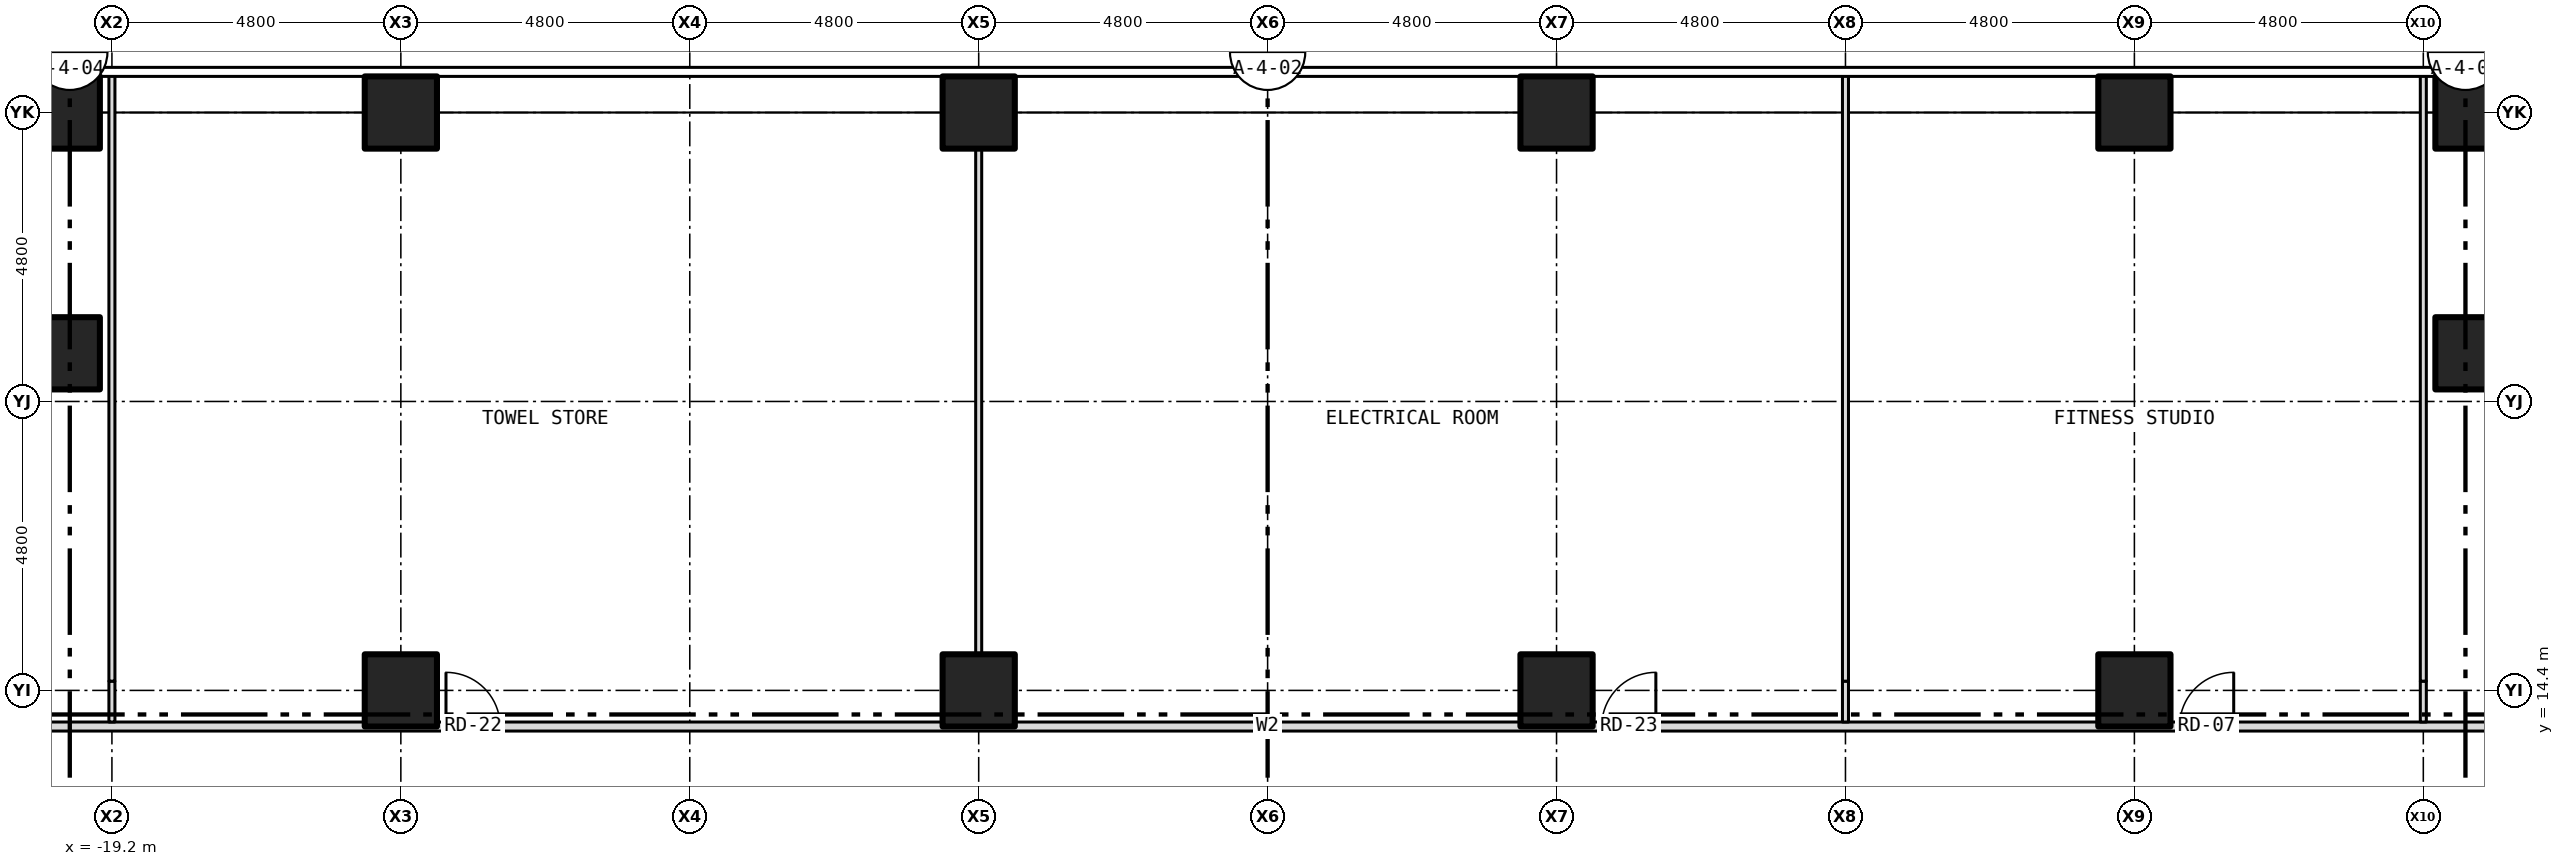
"""IFC4 building model, lengths in metres.
Left out: names, types, materials, properties, quantities, classifications, styles, units other than length and angle.
Written with IfcOpenShell. Run it as: python <this file> out.ifc"""

import sys

from ifc_helpers import new_model, si_unit, direction, frame, frame_2d, origin, origin_2d, place, context, subcontext, project, spatial, rectangle, hollow_rectangle, extrude, element, fill, save


model = new_model("IFC4")
c1 = context("Model", 3, precision=1e-05, world=origin(), true_north=direction((0.0, 1.0)))
c2 = subcontext(c1, "Body", "Model", "MODEL_VIEW")
j1 = project(units=[si_unit("LENGTHUNIT", "METRE"), si_unit("PLANEANGLEUNIT", "RADIAN")], contexts=[c1])
p1 = place(None, origin())
s1 = spatial("IfcSite", under=j1, at=p1, CompositionType="ELEMENT")
p2 = place(p1, origin())
s2 = spatial("IfcBuilding", under=s1, at=p2, CompositionType="ELEMENT")
p3 = place(p2, frame((0.0, 0.0, 24.5)))
s3 = spatial("IfcBuildingStorey", under=s2, at=p3, CompositionType="ELEMENT", Elevation=24.5)
for number, where, z_axis, x_axis in (
    (1, (-20.0, 24.0, -0.2), (0.0, 0.0, 1.0), (1.0, 0.0, 0.0)),
    (2, (-14.4, 24.0, -0.2), (0.0, 0.0, 1.0), (1.0, 0.0, 0.0)),
    (3, (-4.8, 24.0, -0.2), (0.0, 0.0, 1.0), (1.0, 0.0, 0.0)),
    (4, (4.8, 24.0, -0.2), (0.0, 0.0, 1.0), (1.0, 0.0, 0.0)),
    (5, (14.4, 24.0, -0.2), (0.0, 0.0, 1.0), (1.0, 0.0, 0.0)),
    (6, (20.0, 24.0, -0.2), (0.0, 0.0, 1.0), (1.0, 0.0, 0.0)),
    (7, (-20.0, 20.0, -0.2), (0.0, 0.0, 1.0), (1.0, 0.0, 0.0)),
    (8, (-14.4, 14.4, -0.2), (0.0, 0.0, 1.0), (1.0, 0.0, 0.0)),
    (9, (-4.8, 14.4, -0.2), (0.0, 0.0, 1.0), (1.0, 0.0, 0.0)),
    (10, (4.8, 14.4, -0.2), (0.0, 0.0, 1.0), (1.0, 0.0, 0.0)),
    (11, (14.4, 14.4, -0.2), (0.0, 0.0, 1.0), (1.0, 0.0, 0.0)),
    (12, (20.0, 20.0, -0.2), (0.0, 0.0, 1.0), (1.0, 0.0, 0.0)),
):
    element("IfcColumn", number, at=place(p3, frame(where, z_axis=z_axis, x_axis=x_axis)), inside=s3, PredefinedType="COLUMN", context=c2, shape_type="SweptSolid", body=[
        extrude(hollow_rectangle(XDim=1.2, YDim=1.2, WallThickness=0.07, at=origin_2d()), origin(), (0.0, 0.0, 1.0), 4.5),
    ])
p4 = place(p3, frame((-27.0, 13.8, 0.0), z_axis=(0.0, 0.0, 1.0), x_axis=(1.0, 0.0, 0.0)))
e13 = element("IfcWall", 13, at=p4, inside=s3, PredefinedType="PARTITIONING", context=c2, shape_type="SweptSolid", body=[
    extrude(rectangle(XDim=54.0, YDim=0.15, at=frame_2d((27.0, 0.0))), origin(), (0.0, 0.0, 1.0), 4.3),
])
p5 = place(p4, frame((42.15, 0.0, 0.0)))
e14 = element("IfcOpeningElement", 14, at=p5, cuts=e13, PredefinedType="OPENING", context=c2, shape_type="SweptSolid", body=[
    extrude(rectangle(XDim=0.9, YDim=2.1, at=frame_2d((0.45, 1.05))), frame((0.0, 0.087, 0.0), z_axis=(0.0, -1.0, 0.0), x_axis=(1.0, 0.0, 0.0)), (0.0, 0.0, 1.0), 0.174),
])
p6 = place(p4, frame((3.75, 0.0, 0.0)))
e15 = element("IfcOpeningElement", 15, at=p6, cuts=e13, PredefinedType="OPENING", context=c2, shape_type="SweptSolid", body=[
    extrude(rectangle(XDim=0.9, YDim=2.1, at=frame_2d((0.45, 1.05))), frame((0.0, 0.087, 0.0), z_axis=(0.0, -1.0, 0.0), x_axis=(1.0, 0.0, 0.0)), (0.0, 0.0, 1.0), 0.174),
])
p7 = place(p4, frame((49.35, 0.0, 0.0)))
e16 = element("IfcOpeningElement", 16, at=p7, cuts=e13, PredefinedType="OPENING", context=c2, shape_type="SweptSolid", body=[
    extrude(rectangle(XDim=0.9, YDim=2.1, at=frame_2d((0.45, 1.05))), frame((0.0, 0.087, 0.0), z_axis=(0.0, -1.0, 0.0), x_axis=(1.0, 0.0, 0.0)), (0.0, 0.0, 1.0), 0.174),
])
p8 = place(p4, frame((13.35, 0.0, 0.0)))
e17 = element("IfcOpeningElement", 17, at=p8, cuts=e13, PredefinedType="OPENING", context=c2, shape_type="SweptSolid", body=[
    extrude(rectangle(XDim=0.9, YDim=2.1, at=frame_2d((0.45, 1.05))), frame((0.0, 0.087, 0.0), z_axis=(0.0, -1.0, 0.0), x_axis=(1.0, 0.0, 0.0)), (0.0, 0.0, 1.0), 0.174),
])
p9 = place(p4, frame((32.55, 0.0, 0.0)))
e18 = element("IfcOpeningElement", 18, at=p9, cuts=e13, PredefinedType="OPENING", context=c2, shape_type="SweptSolid", body=[
    extrude(rectangle(XDim=0.9, YDim=2.1, at=frame_2d((0.45, 1.05))), frame((0.0, 0.087, 0.0), z_axis=(0.0, -1.0, 0.0), x_axis=(1.0, 0.0, 0.0)), (0.0, 0.0, 1.0), 0.174),
])
p10 = place(p3, frame((-19.2, 13.875, 0.0), z_axis=(0.0, 0.0, 1.0), x_axis=(0.0, 1.0, 0.0)))
e19 = element("IfcWall", 19, at=p10, inside=s3, PredefinedType="PARTITIONING", context=c2, shape_type="SweptSolid", body=[
    extrude(rectangle(XDim=0.679, YDim=0.1, at=frame_2d((0.339, 0.0))), origin(), (0.0, 0.0, 1.0), 4.3),
])
p11 = place(p3, frame((-19.2, 14.554, 0.0), z_axis=(0.0, 0.0, 1.0), x_axis=(0.0, 1.0, 0.0)))
e20 = element("IfcWall", 20, at=p11, inside=s3, PredefinedType="PARTITIONING", context=c2, shape_type="SweptSolid", body=[
    extrude(rectangle(XDim=10.076, YDim=0.1, at=frame_2d((5.038, 0.0))), origin(), (0.0, 0.0, 1.0), 3.683),
])
p12 = place(p3, frame((-4.8, 13.875, 0.0), z_axis=(0.0, 0.0, 1.0), x_axis=(0.0, 1.0, 0.0)))
e21 = element("IfcWall", 21, at=p12, inside=s3, PredefinedType="PARTITIONING", context=c2, shape_type="SweptSolid", body=[
    extrude(rectangle(XDim=1.125, YDim=0.1, at=frame_2d((0.562, 0.0))), origin(), (0.0, 0.0, 1.0), 4.3),
])
p13 = place(p3, frame((-4.8, 15.0, 0.0), z_axis=(0.0, 0.0, 1.0), x_axis=(0.0, 1.0, 0.0)))
e22 = element("IfcWall", 22, at=p13, inside=s3, PredefinedType="PARTITIONING", context=c2, shape_type="SweptSolid", body=[
    extrude(rectangle(XDim=8.4, YDim=0.1, at=frame_2d((4.2, 0.0))), origin(), (0.0, 0.0, 1.0), 3.373),
])
p14 = place(p3, frame((-4.8, 23.4, 0.0), z_axis=(0.0, 0.0, 1.0), x_axis=(0.0, 1.0, 0.0)))
e23 = element("IfcWall", 23, at=p14, inside=s3, PredefinedType="PARTITIONING", context=c2, shape_type="SweptSolid", body=[
    extrude(rectangle(XDim=0.48, YDim=0.1, at=frame_2d((0.24, 0.0))), origin(), (0.0, 0.0, 1.0), 4.3),
])
p15 = place(p3, frame((9.6, 13.875, 0.0), z_axis=(0.0, 0.0, 1.0), x_axis=(0.0, 1.0, 0.0)))
e24 = element("IfcWall", 24, at=p15, inside=s3, PredefinedType="PARTITIONING", context=c2, shape_type="SweptSolid", body=[
    extrude(rectangle(XDim=0.679, YDim=0.1, at=frame_2d((0.339, 0.0))), origin(), (0.0, 0.0, 1.0), 4.3),
])
p16 = place(p3, frame((9.6, 14.554, 0.0), z_axis=(0.0, 0.0, 1.0), x_axis=(0.0, 1.0, 0.0)))
e25 = element("IfcWall", 25, at=p16, inside=s3, PredefinedType="PARTITIONING", context=c2, shape_type="SweptSolid", body=[
    extrude(rectangle(XDim=10.076, YDim=0.1, at=frame_2d((5.038, 0.0))), origin(), (0.0, 0.0, 1.0), 3.683),
])
p17 = place(p3, frame((19.2, 13.875, 0.0), z_axis=(0.0, 0.0, 1.0), x_axis=(0.0, 1.0, 0.0)))
e26 = element("IfcWall", 26, at=p17, inside=s3, PredefinedType="PARTITIONING", context=c2, shape_type="SweptSolid", body=[
    extrude(rectangle(XDim=0.679, YDim=0.1, at=frame_2d((0.339, 0.0))), origin(), (0.0, 0.0, 1.0), 4.3),
])
p18 = place(p3, frame((19.2, 14.554, 0.0), z_axis=(0.0, 0.0, 1.0), x_axis=(0.0, 1.0, 0.0)))
e27 = element("IfcWall", 27, at=p18, inside=s3, PredefinedType="PARTITIONING", context=c2, shape_type="SweptSolid", body=[
    extrude(rectangle(XDim=10.076, YDim=0.1, at=frame_2d((5.038, 0.0))), origin(), (0.0, 0.0, 1.0), 3.683),
])
p19 = place(p5, origin())
e28 = element("IfcDoor", 28, at=p19, inside=s3, OperationType="SINGLE_SWING_RIGHT", PredefinedType="DOOR", context=c2, shape_type="SweptSolid", body=[
    extrude(rectangle(XDim=0.9, YDim=2.1, at=frame_2d((0.45, 1.05))), frame((0.0, 0.025, 0.0), z_axis=(0.0, -1.0, 0.0), x_axis=(1.0, 0.0, 0.0)), (0.0, 0.0, 1.0), 0.05),
])
fill(e14, e28)
p20 = place(p8, origin())
e29 = element("IfcDoor", 29, at=p20, inside=s3, OperationType="SINGLE_SWING_LEFT", PredefinedType="DOOR", context=c2, shape_type="SweptSolid", body=[
    extrude(rectangle(XDim=0.9, YDim=2.1, at=frame_2d((0.45, 1.05))), frame((0.0, 0.025, 0.0), z_axis=(0.0, -1.0, 0.0), x_axis=(1.0, 0.0, 0.0)), (0.0, 0.0, 1.0), 0.05),
])
fill(e17, e29)
p21 = place(p9, origin())
e30 = element("IfcDoor", 30, at=p21, inside=s3, OperationType="SINGLE_SWING_RIGHT", PredefinedType="DOOR", context=c2, shape_type="SweptSolid", body=[
    extrude(rectangle(XDim=0.9, YDim=2.1, at=frame_2d((0.45, 1.05))), frame((0.0, 0.025, 0.0), z_axis=(0.0, -1.0, 0.0), x_axis=(1.0, 0.0, 0.0)), (0.0, 0.0, 1.0), 0.05),
])
fill(e18, e30)
save(model, sys.argv[1])
